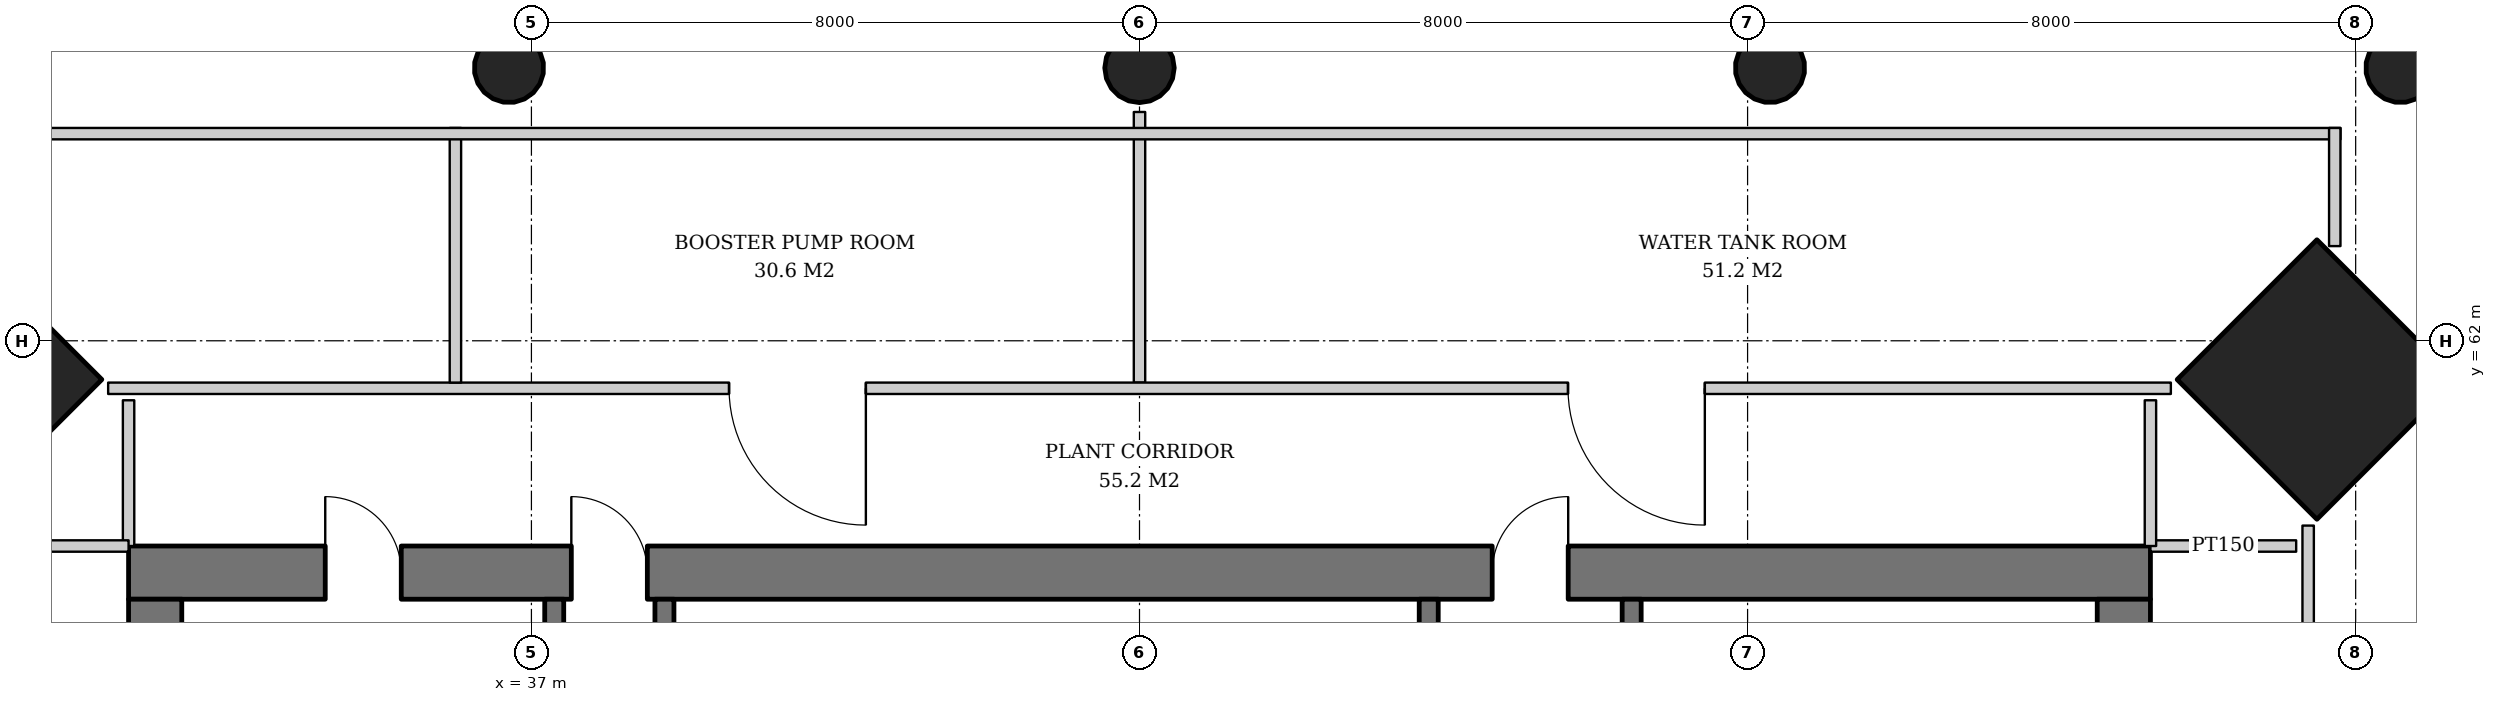
"""IFC4 building model, lengths in metres.
Left out: names, types, materials, properties, quantities, classifications, styles, units other than length and angle.
Written with IfcOpenShell. Run it as: python <this file> out.ifc"""

import sys

from ifc_helpers import new_model, si_unit, direction, frame, frame_2d, origin, origin_2d, place, context, subcontext, project, spatial, rectangle, hollow_circle, extrude, element, fill, save


model = new_model("IFC4")
c1 = context("Model", 3, precision=1e-05, world=origin(), true_north=direction((0.0, 1.0)))
c2 = subcontext(c1, "Body", "Model", "MODEL_VIEW")
j1 = project(units=[si_unit("LENGTHUNIT", "METRE"), si_unit("PLANEANGLEUNIT", "RADIAN")], contexts=[c1])
p1 = place(None, origin())
s1 = spatial("IfcSite", under=j1, at=p1, CompositionType="ELEMENT")
p2 = place(p1, origin())
s2 = spatial("IfcBuilding", under=s1, at=p2, CompositionType="ELEMENT")
p3 = place(p2, frame((0.0, 0.0, 157.8)))
s3 = spatial("IfcBuildingStorey", under=s2, at=p3, CompositionType="ELEMENT", Elevation=157.8)
for number, where, z_axis, x_axis in (
    (1, (60.529, 61.529, 0.0), (-0.032, -0.032, 0.999), (0.707, -0.707, 0.0)),
    (2, (29.471, 61.529, 0.0), (0.032, -0.032, 0.999), (0.707, 0.707, 0.0)),
):
    element("IfcColumn", number, at=place(p3, frame(where, z_axis=z_axis, x_axis=x_axis)), inside=s3, PredefinedType="COLUMN", context=c2, shape_type="SweptSolid", body=[
        extrude(rectangle(XDim=2.6, YDim=2.6, at=origin_2d()), origin(), (0.0, 0.0, 1.0), 3.804),
    ])
p4 = place(p3, frame((61.629, 65.629, 0.0), z_axis=(-0.031962158256, -0.031962158256, 0.998977898093), x_axis=(0.707106781187, -0.707106781187, 0.0)))
e3 = element("IfcColumn", 3, at=p4, inside=s3, PredefinedType="COLUMN", context=c2, shape_type="SweptSolid", body=[
    extrude(hollow_circle(Radius=0.457, WallThickness=0.03, at=origin_2d()), origin(), (0.0, 0.0, 1.0), 3.804),
])
p5 = place(p3, frame((53.314, 65.629, 0.0), z_axis=(-0.015923015547, -0.031974442509, 0.999361842679), x_axis=(0.895145027055, -0.445775033553, 0.0)))
e4 = element("IfcColumn", 4, at=p5, inside=s3, PredefinedType="COLUMN", context=c2, shape_type="SweptSolid", body=[
    extrude(hollow_circle(Radius=0.457, WallThickness=0.03, at=origin_2d()), origin(), (0.0, 0.0, 1.0), 3.802),
])
p6 = place(p3, frame((45.0, 65.629, 0.0), z_axis=(0.0, -0.031978496719, 0.999488557087), x_axis=(1.0, 0.0, 0.0)))
e5 = element("IfcColumn", 5, at=p6, inside=s3, PredefinedType="COLUMN", context=c2, shape_type="SweptSolid", body=[
    extrude(hollow_circle(Radius=0.457, WallThickness=0.03, at=origin_2d()), origin(), (0.0, 0.0, 1.0), 3.802),
])
p7 = place(p3, frame((36.686, 65.629, 0.0), z_axis=(0.015923015547, -0.031974442509, 0.999361842679), x_axis=(0.895145027055, 0.445775033553, 0.0)))
e6 = element("IfcColumn", 6, at=p7, inside=s3, PredefinedType="COLUMN", context=c2, shape_type="SweptSolid", body=[
    extrude(hollow_circle(Radius=0.457, WallThickness=0.03, at=origin_2d()), origin(), (0.0, 0.0, 1.0), 3.802),
])
p8 = place(p3, frame((31.7, 58.95, 0.0), z_axis=(0.0, 0.0, 1.0), x_axis=(1.0, 0.0, 0.0)))
e7 = element("IfcWall", 7, at=p8, inside=s3, PredefinedType="SHEAR", context=c2, shape_type="SweptSolid", body=[
    extrude(rectangle(XDim=26.6, YDim=0.7, at=frame_2d((13.3, 0.0))), origin(), (0.0, 0.0, 1.0), 3.8),
])
p9 = place(p8, frame((17.94, 0.0, 0.0)))
e8 = element("IfcOpeningElement", 8, at=p9, cuts=e7, PredefinedType="OPENING", context=c2, shape_type="SweptSolid", body=[
    extrude(rectangle(XDim=1.0, YDim=2.1, at=frame_2d((0.5, 1.05))), frame((0.0, 0.36, 0.0), z_axis=(0.0, -1.0, 0.0), x_axis=(1.0, 0.0, 0.0)), (0.0, 0.0, 1.0), 0.72),
])
p10 = place(p8, frame((5.825, 0.0, 0.0)))
e9 = element("IfcOpeningElement", 9, at=p10, cuts=e7, PredefinedType="OPENING", context=c2, shape_type="SweptSolid", body=[
    extrude(rectangle(XDim=1.0, YDim=2.1, at=frame_2d((0.5, 1.05))), frame((0.0, 0.36, 0.0), z_axis=(0.0, -1.0, 0.0), x_axis=(1.0, 0.0, 0.0)), (0.0, 0.0, 1.0), 0.72),
])
p11 = place(p8, frame((2.587, 0.0, 0.0)))
e10 = element("IfcOpeningElement", 10, at=p11, cuts=e7, PredefinedType="OPENING", context=c2, shape_type="SweptSolid", body=[
    extrude(rectangle(XDim=1.0, YDim=2.1, at=frame_2d((0.5, 1.05))), frame((0.0, 0.36, 0.0), z_axis=(0.0, -1.0, 0.0), x_axis=(1.0, 0.0, 0.0)), (0.0, 0.0, 1.0), 0.72),
])
p12 = place(p3, frame((32.05, 33.4, 0.0), z_axis=(0.0, 0.0, 1.0), x_axis=(0.0, 1.0, 0.0)))
e11 = element("IfcWall", 11, at=p12, inside=s3, PredefinedType="SHEAR", context=c2, shape_type="SweptSolid", body=[
    extrude(rectangle(XDim=25.2, YDim=0.7, at=frame_2d((12.6, 0.0))), origin(), (0.0, 0.0, 1.0), 3.8),
])
p13 = place(p12, frame((11.7, 0.0, 0.0)))
e12 = element("IfcOpeningElement", 12, at=p13, cuts=e11, PredefinedType="OPENING", context=c2, shape_type="SweptSolid", body=[
    extrude(rectangle(XDim=1.8, YDim=2.4, at=frame_2d((0.9, 1.2))), frame((0.0, 0.36, 0.0), z_axis=(0.0, -1.0, 0.0), x_axis=(1.0, 0.0, 0.0)), (0.0, 0.0, 1.0), 0.72),
])
p14 = place(p12, frame((3.575, 0.0, 0.0)))
e13 = element("IfcOpeningElement", 13, at=p14, cuts=e11, PredefinedType="OPENING", context=c2, shape_type="SweptSolid", body=[
    extrude(rectangle(XDim=1.0, YDim=2.1, at=frame_2d((0.5, 1.05))), frame((0.0, 0.36, 0.0), z_axis=(0.0, -1.0, 0.0), x_axis=(1.0, 0.0, 0.0)), (0.0, 0.0, 1.0), 0.72),
])
p15 = place(p12, frame((6.375, 0.0, 0.0)))
e14 = element("IfcOpeningElement", 14, at=p15, cuts=e11, PredefinedType="OPENING", context=c2, shape_type="SweptSolid", body=[
    extrude(rectangle(XDim=1.0, YDim=2.1, at=frame_2d((0.5, 1.05))), frame((0.0, 0.36, 0.0), z_axis=(0.0, -1.0, 0.0), x_axis=(1.0, 0.0, 0.0)), (0.0, 0.0, 1.0), 0.72),
])
p16 = place(p12, frame((9.1, 0.0, 0.0)))
e15 = element("IfcOpeningElement", 15, at=p16, cuts=e11, PredefinedType="OPENING", context=c2, shape_type="SweptSolid", body=[
    extrude(rectangle(XDim=1.0, YDim=2.1, at=frame_2d((0.5, 1.05))), frame((0.0, 0.36, 0.0), z_axis=(0.0, -1.0, 0.0), x_axis=(1.0, 0.0, 0.0)), (0.0, 0.0, 1.0), 0.72),
])
p17 = place(p12, frame((15.1, 0.0, 0.0)))
e16 = element("IfcOpeningElement", 16, at=p17, cuts=e11, PredefinedType="OPENING", context=c2, shape_type="SweptSolid", body=[
    extrude(rectangle(XDim=1.0, YDim=2.1, at=frame_2d((0.5, 1.05))), frame((0.0, 0.36, 0.0), z_axis=(0.0, -1.0, 0.0), x_axis=(1.0, 0.0, 0.0)), (0.0, 0.0, 1.0), 0.72),
])
p18 = place(p12, frame((17.8, 0.0, 0.0)))
e17 = element("IfcOpeningElement", 17, at=p18, cuts=e11, PredefinedType="OPENING", context=c2, shape_type="SweptSolid", body=[
    extrude(rectangle(XDim=1.0, YDim=2.1, at=frame_2d((0.5, 1.05))), frame((0.0, 0.36, 0.0), z_axis=(0.0, -1.0, 0.0), x_axis=(1.0, 0.0, 0.0)), (0.0, 0.0, 1.0), 0.72),
])
p19 = place(p3, frame((57.95, 33.4, 0.0), z_axis=(0.0, 0.0, 1.0), x_axis=(0.0, 1.0, 0.0)))
e18 = element("IfcWall", 18, at=p19, inside=s3, PredefinedType="SHEAR", context=c2, shape_type="SweptSolid", body=[
    extrude(rectangle(XDim=25.2, YDim=0.7, at=frame_2d((12.6, 0.0))), origin(), (0.0, 0.0, 1.0), 3.8),
])
p20 = place(p19, frame((11.7, 0.0, 0.0)))
e19 = element("IfcOpeningElement", 19, at=p20, cuts=e18, PredefinedType="OPENING", context=c2, shape_type="SweptSolid", body=[
    extrude(rectangle(XDim=1.8, YDim=2.4, at=frame_2d((0.9, 1.2))), frame((0.0, 0.36, 0.0), z_axis=(0.0, -1.0, 0.0), x_axis=(1.0, 0.0, 0.0)), (0.0, 0.0, 1.0), 0.72),
])
p21 = place(p3, frame((48.805, 55.9, 0.0), z_axis=(0.0, 0.0, 1.0), x_axis=(0.0, 1.0, 0.0)))
e20 = element("IfcWall", 20, at=p21, inside=s3, PredefinedType="SOLIDWALL", context=c2, shape_type="SweptSolid", body=[
    extrude(rectangle(XDim=2.7, YDim=0.25, at=frame_2d((1.35, 0.0))), origin(), (0.0, 0.0, 1.0), 3.52),
])
p22 = place(p21, frame((0.85, 0.0, 0.0)))
e21 = element("IfcOpeningElement", 21, at=p22, cuts=e20, PredefinedType="OPENING", context=c2, shape_type="SweptSolid", body=[
    extrude(rectangle(XDim=1.0, YDim=2.1, at=frame_2d((0.5, 1.05))), frame((0.0, 0.135, 0.0), z_axis=(0.0, -1.0, 0.0), x_axis=(1.0, 0.0, 0.0)), (0.0, 0.0, 1.0), 0.27),
])
p23 = place(p3, frame((51.475, 55.9, 0.0), z_axis=(0.0, 0.0, 1.0), x_axis=(0.0, 1.0, 0.0)))
e22 = element("IfcWall", 22, at=p23, inside=s3, PredefinedType="SOLIDWALL", context=c2, shape_type="SweptSolid", body=[
    extrude(rectangle(XDim=2.7, YDim=0.25, at=frame_2d((1.35, 0.0))), origin(), (0.0, 0.0, 1.0), 3.52),
])
p24 = place(p23, frame((0.85, 0.0, 0.0)))
e23 = element("IfcOpeningElement", 23, at=p24, cuts=e22, PredefinedType="OPENING", context=c2, shape_type="SweptSolid", body=[
    extrude(rectangle(XDim=1.0, YDim=2.1, at=frame_2d((0.5, 1.05))), frame((0.0, 0.135, 0.0), z_axis=(0.0, -1.0, 0.0), x_axis=(1.0, 0.0, 0.0)), (0.0, 0.0, 1.0), 0.27),
])
p25 = place(p3, frame((37.3, 55.9, 0.0), z_axis=(0.0, 0.0, 1.0), x_axis=(0.0, 1.0, 0.0)))
e24 = element("IfcWall", 24, at=p25, inside=s3, PredefinedType="SOLIDWALL", context=c2, shape_type="SweptSolid", body=[
    extrude(rectangle(XDim=2.7, YDim=0.25, at=frame_2d((1.35, 0.0))), origin(), (0.0, 0.0, 1.0), 3.52),
])
p26 = place(p3, frame((38.75, 55.9, 0.0), z_axis=(0.0, 0.0, 1.0), x_axis=(0.0, 1.0, 0.0)))
e25 = element("IfcWall", 25, at=p26, inside=s3, PredefinedType="SOLIDWALL", context=c2, shape_type="SweptSolid", body=[
    extrude(rectangle(XDim=2.7, YDim=0.25, at=frame_2d((1.35, 0.0))), origin(), (0.0, 0.0, 1.0), 3.52),
])
p27 = place(p26, frame((0.85, 0.0, 0.0)))
e26 = element("IfcOpeningElement", 26, at=p27, cuts=e25, PredefinedType="OPENING", context=c2, shape_type="SweptSolid", body=[
    extrude(rectangle(XDim=1.0, YDim=2.1, at=frame_2d((0.5, 1.05))), frame((0.0, 0.135, 0.0), z_axis=(0.0, -1.0, 0.0), x_axis=(1.0, 0.0, 0.0)), (0.0, 0.0, 1.0), 0.27),
])
p28 = place(p3, frame((58.3, 59.3, 0.0), z_axis=(0.0, 0.0, 1.0), x_axis=(1.0, 0.0, 0.0)))
e27 = element("IfcWall", 27, at=p28, inside=s3, PredefinedType="PARTITIONING", context=c2, shape_type="SweptSolid", body=[
    extrude(rectangle(XDim=1.917, YDim=0.15, at=frame_2d((0.958, 0.0))), origin(), (0.0, 0.0, 1.0), 3.52),
])
p29 = place(p3, frame((60.375, 32.431, 0.0), z_axis=(0.0, 0.0, 1.0), x_axis=(0.0, 1.0, 0.0)))
e28 = element("IfcWall", 28, at=p29, inside=s3, PredefinedType="SOLIDWALL", context=c2, shape_type="SweptSolid", body=[
    extrude(rectangle(XDim=27.137, YDim=0.15, at=frame_2d((13.569, 0.0))), origin(), (0.0, 0.0, 1.0), 2.706),
])
p30 = place(p29, frame((0.969, 0.0, 0.0)))
e29 = element("IfcOpeningElement", 29, at=p30, cuts=e28, PredefinedType="OPENING", context=c2, shape_type="SweptSolid", body=[
    extrude(rectangle(XDim=1.0, YDim=2.1, at=frame_2d((0.5, 1.05))), frame((0.0, 0.085, 0.0), z_axis=(0.0, -1.0, 0.0), x_axis=(1.0, 0.0, 0.0)), (0.0, 0.0, 1.0), 0.17),
])
p31 = place(p29, frame((7.169, 0.0, 0.0)))
e30 = element("IfcOpeningElement", 30, at=p31, cuts=e28, PredefinedType="OPENING", context=c2, shape_type="SweptSolid", body=[
    extrude(rectangle(XDim=1.8, YDim=2.4, at=frame_2d((0.9, 1.2))), frame((0.0, 0.085, 0.0), z_axis=(0.0, -1.0, 0.0), x_axis=(1.0, 0.0, 0.0)), (0.0, 0.0, 1.0), 0.17),
])
p32 = place(p29, frame((17.169, 0.0, 0.0)))
e31 = element("IfcOpeningElement", 31, at=p32, cuts=e28, PredefinedType="OPENING", context=c2, shape_type="SweptSolid", body=[
    extrude(rectangle(XDim=1.8, YDim=2.4, at=frame_2d((0.9, 1.2))), frame((0.0, 0.085, 0.0), z_axis=(0.0, -1.0, 0.0), x_axis=(1.0, 0.0, 0.0)), (0.0, 0.0, 1.0), 0.17),
])
for number, where, z_axis, x_axis in (
    (32, (31.7, 59.3, 0.0), (0.0, 0.0, 1.0), (0.0, 1.0, 0.0)),
    (33, (58.3, 59.3, 0.0), (0.0, 0.0, 1.0), (0.0, 1.0, 0.0)),
):
    element("IfcWall", number, at=place(p3, frame(where, z_axis=z_axis, x_axis=x_axis)), inside=s3, PredefinedType="PARTITIONING", context=c2, shape_type="SweptSolid", body=[
        extrude(rectangle(XDim=1.917, YDim=0.15, at=frame_2d((0.958, 0.0))), origin(), (0.0, 0.0, 1.0), 3.52),
    ])
p33 = place(p3, frame((45.0, 61.45, 0.0), z_axis=(0.0, 0.0, 1.0), x_axis=(0.0, 1.0, 0.0)))
e34 = element("IfcWall", 34, at=p33, inside=s3, PredefinedType="SOLIDWALL", context=c2, shape_type="SweptSolid", body=[
    extrude(rectangle(XDim=3.56, YDim=0.15, at=frame_2d((1.78, 0.0))), origin(), (0.0, 0.0, 1.0), 3.52),
])
p34 = place(p3, frame((58.569, 61.375, 0.0), z_axis=(0.0, 0.0, 1.0), x_axis=(-1.0, 0.0, 0.0)))
e35 = element("IfcWall", 35, at=p34, inside=s3, PredefinedType="SOLIDWALL", context=c2, shape_type="SweptSolid", body=[
    extrude(rectangle(XDim=27.137, YDim=0.15, at=frame_2d((13.569, 0.0))), origin(), (0.0, 0.0, 1.0), 2.706),
])
p35 = place(p34, frame((6.131, 0.0, 0.0)))
e36 = element("IfcOpeningElement", 36, at=p35, cuts=e35, PredefinedType="OPENING", context=c2, shape_type="SweptSolid", body=[
    extrude(rectangle(XDim=1.8, YDim=2.4, at=frame_2d((0.9, 1.2))), frame((0.0, 0.085, 0.0), z_axis=(0.0, -1.0, 0.0), x_axis=(1.0, 0.0, 0.0)), (0.0, 0.0, 1.0), 0.17),
])
p36 = place(p34, frame((17.169, 0.0, 0.0)))
e37 = element("IfcOpeningElement", 37, at=p36, cuts=e35, PredefinedType="OPENING", context=c2, shape_type="SweptSolid", body=[
    extrude(rectangle(XDim=1.8, YDim=2.4, at=frame_2d((0.9, 1.2))), frame((0.0, 0.085, 0.0), z_axis=(0.0, -1.0, 0.0), x_axis=(1.0, 0.0, 0.0)), (0.0, 0.0, 1.0), 0.17),
])
p37 = place(p3, frame((36.0, 61.45, 0.0), z_axis=(0.0, 0.0, 1.0), x_axis=(0.0, 1.0, 0.0)))
e38 = element("IfcWall", 38, at=p37, inside=s3, PredefinedType="SOLIDWALL", context=c2, shape_type="SweptSolid", body=[
    extrude(rectangle(XDim=3.35, YDim=0.15, at=frame_2d((1.675, 0.0))), origin(), (0.0, 0.0, 1.0), 3.52),
])
p38 = place(p3, frame((31.7, 59.3, 0.0), z_axis=(0.0, 0.0, 1.0), x_axis=(-1.0, 0.0, 0.0)))
e39 = element("IfcWall", 39, at=p38, inside=s3, PredefinedType="PARTITIONING", context=c2, shape_type="SweptSolid", body=[
    extrude(rectangle(XDim=1.917, YDim=0.15, at=frame_2d((0.958, 0.0))), origin(), (0.0, 0.0, 1.0), 3.52),
])
p39 = place(p3, frame((29.2, 64.725, 0.0), z_axis=(0.0, 0.0, 1.0), x_axis=(1.0, 0.0, 0.0)))
e40 = element("IfcWall", 40, at=p39, inside=s3, PredefinedType="PARTITIONING", context=c2, shape_type="SweptSolid", body=[
    extrude(rectangle(XDim=31.6, YDim=0.15, at=frame_2d((15.8, 0.0))), origin(), (0.0, 0.0, 1.0), 2.706),
])
p40 = place(p3, frame((60.725, 64.8, 0.0), z_axis=(0.0, 0.0, 1.0), x_axis=(0.0, -1.0, 0.0)))
e41 = element("IfcWall", 41, at=p40, inside=s3, PredefinedType="PARTITIONING", context=c2, shape_type="SweptSolid", body=[
    extrude(rectangle(XDim=1.554, YDim=0.15, at=frame_2d((0.777, 0.0))), origin(), (0.0, 0.0, 1.0), 2.92),
])
p41 = place(p9, origin())
e42 = element("IfcDoor", 42, at=p41, inside=s3, OperationType="SINGLE_SWING_RIGHT", PredefinedType="DOOR", context=c2, shape_type="SweptSolid", body=[
    extrude(rectangle(XDim=1.0, YDim=2.1, at=frame_2d((0.5, 1.05))), frame((0.0, 0.025, 0.0), z_axis=(0.0, -1.0, 0.0), x_axis=(1.0, 0.0, 0.0)), (0.0, 0.0, 1.0), 0.05),
])
fill(e8, e42)
p42 = place(p10, origin())
e43 = element("IfcDoor", 43, at=p42, inside=s3, OperationType="SINGLE_SWING_LEFT", PredefinedType="DOOR", context=c2, shape_type="SweptSolid", body=[
    extrude(rectangle(XDim=1.0, YDim=2.1, at=frame_2d((0.5, 1.05))), frame((0.0, 0.025, 0.0), z_axis=(0.0, -1.0, 0.0), x_axis=(1.0, 0.0, 0.0)), (0.0, 0.0, 1.0), 0.05),
])
fill(e9, e43)
p43 = place(p11, origin())
e44 = element("IfcDoor", 44, at=p43, inside=s3, OperationType="SINGLE_SWING_LEFT", PredefinedType="DOOR", context=c2, shape_type="SweptSolid", body=[
    extrude(rectangle(XDim=1.0, YDim=2.1, at=frame_2d((0.5, 1.05))), frame((0.0, -0.29, 0.0), z_axis=(0.0, -1.0, 0.0), x_axis=(1.0, 0.0, 0.0)), (0.0, 0.0, 1.0), 0.05),
])
fill(e10, e44)
p44 = place(p35, origin())
e45 = element("IfcDoor", 45, at=p44, inside=s3, OperationType="DOUBLE_DOOR_SINGLE_SWING", PredefinedType="DOOR", context=c2, shape_type="SweptSolid", body=[
    extrude(rectangle(XDim=1.8, YDim=2.4, at=frame_2d((0.9, 1.2))), frame((0.0, 0.025, 0.0), z_axis=(0.0, -1.0, 0.0), x_axis=(1.0, 0.0, 0.0)), (0.0, 0.0, 1.0), 0.05),
])
fill(e36, e45)
p45 = place(p36, origin())
e46 = element("IfcDoor", 46, at=p45, inside=s3, OperationType="DOUBLE_DOOR_SINGLE_SWING", PredefinedType="DOOR", context=c2, shape_type="SweptSolid", body=[
    extrude(rectangle(XDim=1.8, YDim=2.4, at=frame_2d((0.9, 1.2))), frame((0.0, 0.025, 0.0), z_axis=(0.0, -1.0, 0.0), x_axis=(1.0, 0.0, 0.0)), (0.0, 0.0, 1.0), 0.05),
])
fill(e37, e46)
save(model, sys.argv[1])
